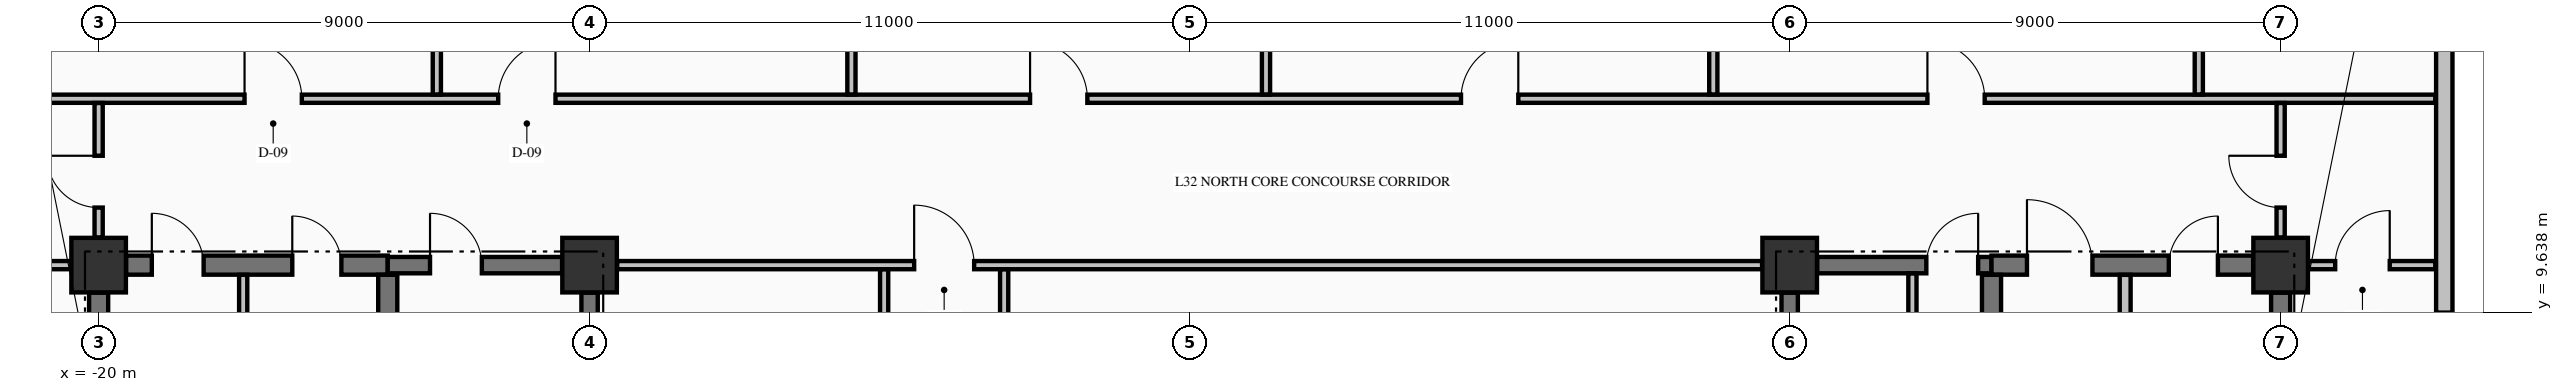
"""IFC4 building model, lengths in metres.
Left out: names, types, materials, properties, quantities, classifications, styles, units other than length and angle.
Written with IfcOpenShell. Run it as: python <this file> out.ifc"""

import sys

from ifc_helpers import new_model, si_unit, direction, frame, frame_2d, origin, origin_2d, place, context, subcontext, project, spatial, rectangle, extrude, element, fill, save


model = new_model("IFC4")
c1 = context("Model", 3, precision=1e-05, world=origin(), true_north=direction((0.0, 1.0)))
c2 = subcontext(c1, "Body", "Model", "MODEL_VIEW")
j1 = project(units=[si_unit("LENGTHUNIT", "METRE"), si_unit("PLANEANGLEUNIT", "RADIAN")], contexts=[c1])
p1 = place(None, origin())
s1 = spatial("IfcSite", under=j1, at=p1, CompositionType="ELEMENT")
p2 = place(p1, origin())
s2 = spatial("IfcBuilding", under=s1, at=p2, CompositionType="ELEMENT")
p3 = place(p2, frame((0.0, 0.0, 128.49)))
s3 = spatial("IfcBuildingStorey", under=s2, at=p3, CompositionType="ELEMENT", Elevation=128.49)
for number, where, z_axis, x_axis in (
    (1, (-20.0, 10.5, -0.25), (0.0, 0.0, 1.0), (1.0, 0.0, 0.0)),
    (2, (-11.0, 10.5, -0.25), (0.0, 0.0, 1.0), (1.0, 0.0, 0.0)),
    (3, (11.0, 10.5, -0.25), (0.0, 0.0, 1.0), (1.0, 0.0, 0.0)),
    (4, (20.0, 10.5, -0.25), (0.0, 0.0, 1.0), (1.0, 0.0, 0.0)),
):
    element("IfcColumn", number, at=place(p3, frame(where, z_axis=z_axis, x_axis=x_axis)), inside=s3, PredefinedType="COLUMN", context=c2, shape_type="SweptSolid", body=[
        extrude(rectangle(XDim=1.0, YDim=1.0, at=origin_2d()), origin(), (0.0, 0.0, 1.0), 3.57),
    ])
p4 = place(p3, frame((23.0, 9.63, 0.0), z_axis=(0.0, 0.0, 1.0), x_axis=(0.0, 1.0, 0.0)))
e5 = element("IfcWall", 5, at=p4, inside=s3, PredefinedType="STANDARD", context=c2, shape_type="SweptSolid", body=[
    extrude(rectangle(XDim=10.74, YDim=0.3, at=frame_2d((5.37, 0.0))), origin(), (0.0, 0.0, 1.0), 2.712),
])
p5 = place(p3, frame((-19.496, 10.5, 0.0), z_axis=(0.0, 0.0, 1.0), x_axis=(1.0, 0.0, 0.0)))
e6 = element("IfcWall", 6, at=p5, inside=s3, PredefinedType="SHEAR", context=c2, shape_type="SweptSolid", body=[
    extrude(rectangle(XDim=4.796, YDim=0.35, at=frame_2d((2.398, 0.0))), origin(), (0.0, 0.0, 1.0), 3.32),
])
p6 = place(p5, frame((0.471, 0.0, 0.0)))
e7 = element("IfcOpeningElement", 7, at=p6, cuts=e6, PredefinedType="OPENING", context=c2, shape_type="SweptSolid", body=[
    extrude(rectangle(XDim=0.95, YDim=2.15, at=frame_2d((0.475, 1.075))), frame((0.0, 0.185, 0.0), z_axis=(0.0, -1.0, 0.0), x_axis=(1.0, 0.0, 0.0)), (0.0, 0.0, 1.0), 0.37),
])
p7 = place(p5, frame((3.046, 0.0, 0.0)))
e8 = element("IfcOpeningElement", 8, at=p7, cuts=e6, PredefinedType="OPENING", context=c2, shape_type="SweptSolid", body=[
    extrude(rectangle(XDim=0.9, YDim=2.15, at=frame_2d((0.45, 1.075))), frame((0.0, 0.185, 0.0), z_axis=(0.0, -1.0, 0.0), x_axis=(1.0, 0.0, 0.0)), (0.0, 0.0, 1.0), 0.37),
])
p8 = place(p3, frame((-14.7, 10.5, 0.0), z_axis=(0.0, 0.0, 1.0), x_axis=(1.0, 0.0, 0.0)))
e9 = element("IfcWall", 9, at=p8, inside=s3, PredefinedType="SHEAR", context=c2, shape_type="SweptSolid", body=[
    extrude(rectangle(XDim=3.196, YDim=0.3, at=frame_2d((1.598, 0.0))), origin(), (0.0, 0.0, 1.0), 3.32),
])
p9 = place(p8, frame((0.775, 0.0, 0.0)))
e10 = element("IfcOpeningElement", 10, at=p9, cuts=e9, PredefinedType="OPENING", context=c2, shape_type="SweptSolid", body=[
    extrude(rectangle(XDim=0.95, YDim=2.15, at=frame_2d((0.475, 1.075))), frame((0.0, 0.16, 0.0), z_axis=(0.0, -1.0, 0.0), x_axis=(1.0, 0.0, 0.0)), (0.0, 0.0, 1.0), 0.32),
])
p10 = place(p3, frame((11.504, 10.5, 0.0), z_axis=(0.0, 0.0, 1.0), x_axis=(1.0, 0.0, 0.0)))
e11 = element("IfcWall", 11, at=p10, inside=s3, PredefinedType="SHEAR", context=c2, shape_type="SweptSolid", body=[
    extrude(rectangle(XDim=3.196, YDim=0.3, at=frame_2d((1.598, 0.0))), origin(), (0.0, 0.0, 1.0), 3.32),
])
p11 = place(p10, frame((2.001, 0.0, 0.0)))
e12 = element("IfcOpeningElement", 12, at=p11, cuts=e11, PredefinedType="OPENING", context=c2, shape_type="SweptSolid", body=[
    extrude(rectangle(XDim=0.95, YDim=2.15, at=frame_2d((0.475, 1.075))), frame((0.0, 0.16, 0.0), z_axis=(0.0, -1.0, 0.0), x_axis=(1.0, 0.0, 0.0)), (0.0, 0.0, 1.0), 0.32),
])
p12 = place(p3, frame((14.7, 10.5, 0.0), z_axis=(0.0, 0.0, 1.0), x_axis=(1.0, 0.0, 0.0)))
e13 = element("IfcWall", 13, at=p12, inside=s3, PredefinedType="SHEAR", context=c2, shape_type="SweptSolid", body=[
    extrude(rectangle(XDim=4.796, YDim=0.35, at=frame_2d((2.398, 0.0))), origin(), (0.0, 0.0, 1.0), 3.32),
])
p13 = place(p12, frame((0.65, 0.0, 0.0)))
e14 = element("IfcOpeningElement", 14, at=p13, cuts=e13, PredefinedType="OPENING", context=c2, shape_type="SweptSolid", body=[
    extrude(rectangle(XDim=1.2, YDim=2.15, at=frame_2d((0.6, 1.075))), frame((0.0, 0.185, 0.0), z_axis=(0.0, -1.0, 0.0), x_axis=(1.0, 0.0, 0.0)), (0.0, 0.0, 1.0), 0.37),
])
p14 = place(p12, frame((3.25, 0.0, 0.0)))
e15 = element("IfcOpeningElement", 15, at=p14, cuts=e13, PredefinedType="OPENING", context=c2, shape_type="SweptSolid", body=[
    extrude(rectangle(XDim=0.9, YDim=2.15, at=frame_2d((0.45, 1.075))), frame((0.0, 0.185, 0.0), z_axis=(0.0, -1.0, 0.0), x_axis=(1.0, 0.0, 0.0)), (0.0, 0.0, 1.0), 0.37),
])
p15 = place(p3, frame((-27.835, 10.5, 0.0), z_axis=(0.0, 0.0, 1.0), x_axis=(1.0, 0.0, 0.0)))
e16 = element("IfcWall", 16, at=p15, inside=s3, PredefinedType="PARTITIONING", context=c2, shape_type="SweptSolid", body=[
    extrude(rectangle(XDim=7.329, YDim=0.15, at=frame_2d((3.665, 0.0))), origin(), (0.0, 0.0, 1.0), 3.32),
])
p16 = place(p15, frame((3.36, 0.0, 0.0)))
e17 = element("IfcOpeningElement", 17, at=p16, cuts=e16, PredefinedType="OPENING", context=c2, shape_type="SweptSolid", body=[
    extrude(rectangle(XDim=0.95, YDim=2.15, at=frame_2d((0.475, 1.075))), frame((0.0, 0.085, 0.0), z_axis=(0.0, -1.0, 0.0), x_axis=(1.0, 0.0, 0.0)), (0.0, 0.0, 1.0), 0.17),
])
p17 = place(p3, frame((-10.494, 10.5, 0.0), z_axis=(0.0, 0.0, 1.0), x_axis=(1.0, 0.0, 0.0)))
e18 = element("IfcWall", 18, at=p17, inside=s3, PredefinedType="PARTITIONING", context=c2, shape_type="SweptSolid", body=[
    extrude(rectangle(XDim=20.988, YDim=0.15, at=frame_2d((10.494, 0.0))), origin(), (0.0, 0.0, 1.0), 3.32),
])
p18 = place(p17, frame((5.444, 0.0, 0.0)))
e19 = element("IfcOpeningElement", 19, at=p18, cuts=e18, PredefinedType="OPENING", context=c2, shape_type="SweptSolid", body=[
    extrude(rectangle(XDim=1.1, YDim=2.15, at=frame_2d((0.55, 1.075))), frame((0.0, 0.085, 0.0), z_axis=(0.0, -1.0, 0.0), x_axis=(1.0, 0.0, 0.0)), (0.0, 0.0, 1.0), 0.17),
])
p19 = place(p3, frame((20.506, 10.5, 0.0), z_axis=(0.0, 0.0, 1.0), x_axis=(1.0, 0.0, 0.0)))
e20 = element("IfcWall", 20, at=p19, inside=s3, PredefinedType="PARTITIONING", context=c2, shape_type="SweptSolid", body=[
    extrude(rectangle(XDim=2.329, YDim=0.15, at=frame_2d((1.165, 0.0))), origin(), (0.0, 0.0, 1.0), 3.32),
])
p20 = place(p19, frame((0.494, 0.0, 0.0)))
e21 = element("IfcOpeningElement", 21, at=p20, cuts=e20, PredefinedType="OPENING", context=c2, shape_type="SweptSolid", body=[
    extrude(rectangle(XDim=1.0, YDim=2.15, at=frame_2d((0.5, 1.075))), frame((0.0, 0.085, 0.0), z_axis=(0.0, -1.0, 0.0), x_axis=(1.0, 0.0, 0.0)), (0.0, 0.0, 1.0), 0.17),
])
p21 = place(p3, frame((-27.835, 13.55, 0.0), z_axis=(0.0, 0.0, 1.0), x_axis=(1.0, 0.0, 0.0)))
e22 = element("IfcWall", 22, at=p21, inside=s3, PredefinedType="PARTITIONING", context=c2, shape_type="SweptSolid", body=[
    extrude(rectangle(XDim=50.67, YDim=0.15, at=frame_2d((25.335, 0.0))), origin(), (0.0, 0.0, 1.0), 3.32),
])
p22 = place(p21, frame((10.51, 0.0, 0.0)))
e23 = element("IfcOpeningElement", 23, at=p22, cuts=e22, PredefinedType="OPENING", context=c2, shape_type="SweptSolid", body=[
    extrude(rectangle(XDim=1.05, YDim=2.15, at=frame_2d((0.525, 1.075))), frame((0.0, 0.085, 0.0), z_axis=(0.0, -1.0, 0.0), x_axis=(1.0, 0.0, 0.0)), (0.0, 0.0, 1.0), 0.17),
])
p23 = place(p21, frame((15.16, 0.0, 0.0)))
e24 = element("IfcOpeningElement", 24, at=p23, cuts=e22, PredefinedType="OPENING", context=c2, shape_type="SweptSolid", body=[
    extrude(rectangle(XDim=1.05, YDim=2.15, at=frame_2d((0.525, 1.075))), frame((0.0, 0.085, 0.0), z_axis=(0.0, -1.0, 0.0), x_axis=(1.0, 0.0, 0.0)), (0.0, 0.0, 1.0), 0.17),
])
p24 = place(p21, frame((24.91, 0.0, 0.0)))
e25 = element("IfcOpeningElement", 25, at=p24, cuts=e22, PredefinedType="OPENING", context=c2, shape_type="SweptSolid", body=[
    extrude(rectangle(XDim=1.05, YDim=2.15, at=frame_2d((0.525, 1.075))), frame((0.0, 0.085, 0.0), z_axis=(0.0, -1.0, 0.0), x_axis=(1.0, 0.0, 0.0)), (0.0, 0.0, 1.0), 0.17),
])
p25 = place(p21, frame((32.81, 0.0, 0.0)))
e26 = element("IfcOpeningElement", 26, at=p25, cuts=e22, PredefinedType="OPENING", context=c2, shape_type="SweptSolid", body=[
    extrude(rectangle(XDim=1.05, YDim=2.15, at=frame_2d((0.525, 1.075))), frame((0.0, 0.085, 0.0), z_axis=(0.0, -1.0, 0.0), x_axis=(1.0, 0.0, 0.0)), (0.0, 0.0, 1.0), 0.17),
])
p26 = place(p21, frame((41.36, 0.0, 0.0)))
e27 = element("IfcOpeningElement", 27, at=p26, cuts=e22, PredefinedType="OPENING", context=c2, shape_type="SweptSolid", body=[
    extrude(rectangle(XDim=1.05, YDim=2.15, at=frame_2d((0.525, 1.075))), frame((0.0, 0.085, 0.0), z_axis=(0.0, -1.0, 0.0), x_axis=(1.0, 0.0, 0.0)), (0.0, 0.0, 1.0), 0.17),
])
p27 = place(p3, frame((-20.0, 0.504, 0.0), z_axis=(0.0, 0.0, 1.0), x_axis=(0.0, 1.0, 0.0)))
e28 = element("IfcWall", 28, at=p27, inside=s3, PredefinedType="SHEAR", context=c2, shape_type="SweptSolid", body=[
    extrude(rectangle(XDim=9.492, YDim=0.35, at=frame_2d((4.746, 0.0))), origin(), (0.0, 0.0, 1.0), 3.32),
])
p28 = place(p3, frame((-14.7, 5.852, 0.0), z_axis=(0.0, 0.0, 1.0), x_axis=(0.0, 1.0, 0.0)))
e29 = element("IfcWall", 29, at=p28, inside=s3, PredefinedType="SHEAR", context=c2, shape_type="SweptSolid", body=[
    extrude(rectangle(XDim=4.471, YDim=0.35, at=frame_2d((2.235, 0.0))), origin(), (0.0, 0.0, 1.0), 3.32),
])
for number, where, z_axis, x_axis in (
    (30, (-11.0, 5.852, 0.0), (0.0, 0.0, 1.0), (0.0, 1.0, 0.0)),
    (31, (11.0, 5.852, 0.0), (0.0, 0.0, 1.0), (0.0, 1.0, 0.0)),
):
    element("IfcWall", number, at=place(p3, frame(where, z_axis=z_axis, x_axis=x_axis)), inside=s3, PredefinedType="SHEAR", context=c2, shape_type="SweptSolid", body=[
        extrude(rectangle(XDim=4.144, YDim=0.3, at=frame_2d((2.072, 0.0))), origin(), (0.0, 0.0, 1.0), 3.32),
    ])
p29 = place(p3, frame((14.7, 5.852, 0.0), z_axis=(0.0, 0.0, 1.0), x_axis=(0.0, 1.0, 0.0)))
e32 = element("IfcWall", 32, at=p29, inside=s3, PredefinedType="SHEAR", context=c2, shape_type="SweptSolid", body=[
    extrude(rectangle(XDim=4.471, YDim=0.35, at=frame_2d((2.235, 0.0))), origin(), (0.0, 0.0, 1.0), 3.32),
])
p30 = place(p3, frame((20.0, 5.377, 0.0), z_axis=(0.0, 0.0, 1.0), x_axis=(0.0, 1.0, 0.0)))
e33 = element("IfcWall", 33, at=p30, inside=s3, PredefinedType="SHEAR", context=c2, shape_type="SweptSolid", body=[
    extrude(rectangle(XDim=4.619, YDim=0.35, at=frame_2d((2.31, 0.0))), origin(), (0.0, 0.0, 1.0), 3.32),
])
p31 = place(p3, frame((-20.0, 11.006, 0.0), z_axis=(0.0, 0.0, 1.0), x_axis=(0.0, 1.0, 0.0)))
e34 = element("IfcWall", 34, at=p31, inside=s3, PredefinedType="PARTITIONING", context=c2, shape_type="SweptSolid", body=[
    extrude(rectangle(XDim=2.466, YDim=0.15, at=frame_2d((1.233, 0.0))), origin(), (0.0, 0.0, 1.0), 2.81),
])
p32 = place(p31, frame((0.549, 0.0, 0.0)))
e35 = element("IfcOpeningElement", 35, at=p32, cuts=e34, PredefinedType="OPENING", context=c2, shape_type="SweptSolid", body=[
    extrude(rectangle(XDim=0.95, YDim=2.15, at=frame_2d((0.475, 1.075))), frame((0.0, 0.085, 0.0), z_axis=(0.0, -1.0, 0.0), x_axis=(1.0, 0.0, 0.0)), (0.0, 0.0, 1.0), 0.17),
])
p33 = place(p3, frame((-17.35, 5.178, 0.0), z_axis=(0.0, 0.0, 1.0), x_axis=(0.0, 1.0, 0.0)))
e36 = element("IfcWall", 36, at=p33, inside=s3, PredefinedType="PARTITIONING", context=c2, shape_type="SweptSolid", body=[
    extrude(rectangle(XDim=5.144, YDim=0.15, at=frame_2d((2.572, 0.0))), origin(), (0.0, 0.0, 1.0), 3.32),
])
for number, where, z_axis, x_axis in (
    (37, (-13.8, 13.628, 0.0), (0.0, 0.0, 1.0), (0.0, 1.0, 0.0)),
    (38, (-6.2, 13.628, 0.0), (0.0, 0.0, 1.0), (0.0, 1.0, 0.0)),
):
    element("IfcWall", number, at=place(p3, frame(where, z_axis=z_axis, x_axis=x_axis)), inside=s3, PredefinedType="PARTITIONING", context=c2, shape_type="SweptSolid", body=[
        extrude(rectangle(XDim=11.707, YDim=0.15, at=frame_2d((5.854, 0.0))), origin(), (0.0, 0.0, 1.0), 3.32),
    ])
for number, where, z_axis, x_axis in (
    (39, (-5.6, 2.978, 0.0), (0.0, 0.0, 1.0), (0.0, 1.0, 0.0)),
    (40, (-3.4, 2.978, 0.0), (0.0, 0.0, 1.0), (0.0, 1.0, 0.0)),
):
    element("IfcWall", number, at=place(p3, frame(where, z_axis=z_axis, x_axis=x_axis)), inside=s3, PredefinedType="PARTITIONING", context=c2, shape_type="SweptSolid", body=[
        extrude(rectangle(XDim=7.444, YDim=0.15, at=frame_2d((3.722, 0.0))), origin(), (0.0, 0.0, 1.0), 3.32),
    ])
for number, where, z_axis, x_axis in (
    (41, (1.4, 13.628, 0.0), (0.0, 0.0, 1.0), (0.0, 1.0, 0.0)),
    (42, (9.6, 13.628, 0.0), (0.0, 0.0, 1.0), (0.0, 1.0, 0.0)),
):
    element("IfcWall", number, at=place(p3, frame(where, z_axis=z_axis, x_axis=x_axis)), inside=s3, PredefinedType="PARTITIONING", context=c2, shape_type="SweptSolid", body=[
        extrude(rectangle(XDim=11.707, YDim=0.15, at=frame_2d((5.854, 0.0))), origin(), (0.0, 0.0, 1.0), 3.32),
    ])
p34 = place(p3, frame((13.25, 5.853, 0.0), z_axis=(0.0, 0.0, 1.0), x_axis=(0.0, 1.0, 0.0)))
e43 = element("IfcWall", 43, at=p34, inside=s3, PredefinedType="PARTITIONING", context=c2, shape_type="SweptSolid", body=[
    extrude(rectangle(XDim=4.494, YDim=0.15, at=frame_2d((2.247, 0.0))), origin(), (0.0, 0.0, 1.0), 3.32),
])
p35 = place(p34, frame((1.472, 0.0, 0.0)))
e44 = element("IfcOpeningElement", 44, at=p35, cuts=e43, PredefinedType="OPENING", context=c2, shape_type="SweptSolid", body=[
    extrude(rectangle(XDim=0.95, YDim=2.15, at=frame_2d((0.475, 1.075))), frame((0.0, 0.085, 0.0), z_axis=(0.0, -1.0, 0.0), x_axis=(1.0, 0.0, 0.0)), (0.0, 0.0, 1.0), 0.17),
])
p36 = place(p3, frame((17.15, 5.378, 0.0), z_axis=(0.0, 0.0, 1.0), x_axis=(0.0, 1.0, 0.0)))
e45 = element("IfcWall", 45, at=p36, inside=s3, PredefinedType="PARTITIONING", context=c2, shape_type="SweptSolid", body=[
    extrude(rectangle(XDim=4.944, YDim=0.2, at=frame_2d((2.472, 0.0))), origin(), (0.0, 0.0, 1.0), 3.32),
])
p37 = place(p3, frame((18.5, 13.628, 0.0), z_axis=(0.0, 0.0, 1.0), x_axis=(0.0, 1.0, 0.0)))
e46 = element("IfcWall", 46, at=p37, inside=s3, PredefinedType="PARTITIONING", context=c2, shape_type="SweptSolid", body=[
    extrude(rectangle(XDim=6.766, YDim=0.15, at=frame_2d((3.383, 0.0))), origin(), (0.0, 0.0, 1.0), 3.32),
])
p38 = place(p3, frame((20.0, 11.006, 0.0), z_axis=(0.0, 0.0, 1.0), x_axis=(0.0, 1.0, 0.0)))
e47 = element("IfcWall", 47, at=p38, inside=s3, PredefinedType="PARTITIONING", context=c2, shape_type="SweptSolid", body=[
    extrude(rectangle(XDim=2.466, YDim=0.15, at=frame_2d((1.233, 0.0))), origin(), (0.0, 0.0, 1.0), 2.81),
])
p39 = place(p38, frame((0.549, 0.0, 0.0)))
e48 = element("IfcOpeningElement", 48, at=p39, cuts=e47, PredefinedType="OPENING", context=c2, shape_type="SweptSolid", body=[
    extrude(rectangle(XDim=0.95, YDim=2.15, at=frame_2d((0.475, 1.075))), frame((0.0, 0.085, 0.0), z_axis=(0.0, -1.0, 0.0), x_axis=(1.0, 0.0, 0.0)), (0.0, 0.0, 1.0), 0.17),
])
p40 = place(p9, origin())
e49 = element("IfcDoor", 49, at=p40, inside=s3, OperationType="SINGLE_SWING_LEFT", PredefinedType="DOOR", context=c2, shape_type="SweptSolid", body=[
    extrude(rectangle(XDim=0.95, YDim=2.15, at=frame_2d((0.475, 1.075))), frame((0.0, 0.025, 0.0), z_axis=(0.0, -1.0, 0.0), x_axis=(1.0, 0.0, 0.0)), (0.0, 0.0, 1.0), 0.05),
])
fill(e10, e49)
p41 = place(p11, origin())
e50 = element("IfcDoor", 50, at=p41, inside=s3, OperationType="SINGLE_SWING_RIGHT", PredefinedType="DOOR", context=c2, shape_type="SweptSolid", body=[
    extrude(rectangle(XDim=0.95, YDim=2.15, at=frame_2d((0.475, 1.075))), frame((0.0, 0.025, 0.0), z_axis=(0.0, -1.0, 0.0), x_axis=(1.0, 0.0, 0.0)), (0.0, 0.0, 1.0), 0.05),
])
fill(e12, e50)
p42 = place(p6, origin())
e51 = element("IfcDoor", 51, at=p42, inside=s3, OperationType="SINGLE_SWING_LEFT", PredefinedType="DOOR", context=c2, shape_type="SweptSolid", body=[
    extrude(rectangle(XDim=0.95, YDim=2.15, at=frame_2d((0.475, 1.075))), frame((0.0, 0.025, 0.0), z_axis=(0.0, -1.0, 0.0), x_axis=(1.0, 0.0, 0.0)), (0.0, 0.0, 1.0), 0.05),
])
fill(e7, e51)
p43 = place(p7, origin())
e52 = element("IfcDoor", 52, at=p43, inside=s3, OperationType="SINGLE_SWING_LEFT", PredefinedType="DOOR", context=c2, shape_type="SweptSolid", body=[
    extrude(rectangle(XDim=0.9, YDim=2.15, at=frame_2d((0.45, 1.075))), frame((0.0, 0.025, 0.0), z_axis=(0.0, -1.0, 0.0), x_axis=(1.0, 0.0, 0.0)), (0.0, 0.0, 1.0), 0.05),
])
fill(e8, e52)
p44 = place(p13, origin())
e53 = element("IfcDoor", 53, at=p44, inside=s3, OperationType="SINGLE_SWING_LEFT", PredefinedType="DOOR", context=c2, shape_type="SweptSolid", body=[
    extrude(rectangle(XDim=1.2, YDim=2.15, at=frame_2d((0.6, 1.075))), frame((0.0, 0.025, 0.0), z_axis=(0.0, -1.0, 0.0), x_axis=(1.0, 0.0, 0.0)), (0.0, 0.0, 1.0), 0.05),
])
fill(e14, e53)
p45 = place(p14, origin())
e54 = element("IfcDoor", 54, at=p45, inside=s3, OperationType="SINGLE_SWING_RIGHT", PredefinedType="DOOR", context=c2, shape_type="SweptSolid", body=[
    extrude(rectangle(XDim=0.9, YDim=2.15, at=frame_2d((0.45, 1.075))), frame((0.0, 0.025, 0.0), z_axis=(0.0, -1.0, 0.0), x_axis=(1.0, 0.0, 0.0)), (0.0, 0.0, 1.0), 0.05),
])
fill(e15, e54)
p46 = place(p18, origin())
e55 = element("IfcDoor", 55, at=p46, inside=s3, OperationType="SINGLE_SWING_LEFT", PredefinedType="DOOR", context=c2, shape_type="SweptSolid", body=[
    extrude(rectangle(XDim=1.1, YDim=2.15, at=frame_2d((0.55, 1.075))), frame((0.0, 0.025, 0.0), z_axis=(0.0, -1.0, 0.0), x_axis=(1.0, 0.0, 0.0)), (0.0, 0.0, 1.0), 0.05),
])
fill(e19, e55)
p47 = place(p22, origin())
e56 = element("IfcDoor", 56, at=p47, inside=s3, OperationType="SINGLE_SWING_LEFT", PredefinedType="DOOR", context=c2, shape_type="SweptSolid", body=[
    extrude(rectangle(XDim=1.05, YDim=2.15, at=frame_2d((0.525, 1.075))), frame((0.0, 0.025, 0.0), z_axis=(0.0, -1.0, 0.0), x_axis=(1.0, 0.0, 0.0)), (0.0, 0.0, 1.0), 0.05),
])
fill(e23, e56)
p48 = place(p23, origin())
e57 = element("IfcDoor", 57, at=p48, inside=s3, OperationType="SINGLE_SWING_RIGHT", PredefinedType="DOOR", context=c2, shape_type="SweptSolid", body=[
    extrude(rectangle(XDim=1.05, YDim=2.15, at=frame_2d((0.525, 1.075))), frame((0.0, 0.025, 0.0), z_axis=(0.0, -1.0, 0.0), x_axis=(1.0, 0.0, 0.0)), (0.0, 0.0, 1.0), 0.05),
])
fill(e24, e57)
p49 = place(p24, origin())
e58 = element("IfcDoor", 58, at=p49, inside=s3, OperationType="SINGLE_SWING_LEFT", PredefinedType="DOOR", context=c2, shape_type="SweptSolid", body=[
    extrude(rectangle(XDim=1.05, YDim=2.15, at=frame_2d((0.525, 1.075))), frame((0.0, 0.025, 0.0), z_axis=(0.0, -1.0, 0.0), x_axis=(1.0, 0.0, 0.0)), (0.0, 0.0, 1.0), 0.05),
])
fill(e25, e58)
p50 = place(p25, origin())
e59 = element("IfcDoor", 59, at=p50, inside=s3, OperationType="SINGLE_SWING_RIGHT", PredefinedType="DOOR", context=c2, shape_type="SweptSolid", body=[
    extrude(rectangle(XDim=1.05, YDim=2.15, at=frame_2d((0.525, 1.075))), frame((0.0, 0.025, 0.0), z_axis=(0.0, -1.0, 0.0), x_axis=(1.0, 0.0, 0.0)), (0.0, 0.0, 1.0), 0.05),
])
fill(e26, e59)
p51 = place(p26, origin())
e60 = element("IfcDoor", 60, at=p51, inside=s3, OperationType="SINGLE_SWING_LEFT", PredefinedType="DOOR", context=c2, shape_type="SweptSolid", body=[
    extrude(rectangle(XDim=1.05, YDim=2.15, at=frame_2d((0.525, 1.075))), frame((0.0, 0.025, 0.0), z_axis=(0.0, -1.0, 0.0), x_axis=(1.0, 0.0, 0.0)), (0.0, 0.0, 1.0), 0.05),
])
fill(e27, e60)
p52 = place(p32, origin())
e61 = element("IfcDoor", 61, at=p52, inside=s3, OperationType="SINGLE_SWING_RIGHT", PredefinedType="DOOR", context=c2, shape_type="SweptSolid", body=[
    extrude(rectangle(XDim=0.95, YDim=2.15, at=frame_2d((0.475, 1.075))), frame((0.0, 0.025, 0.0), z_axis=(0.0, -1.0, 0.0), x_axis=(1.0, 0.0, 0.0)), (0.0, 0.0, 1.0), 0.05),
])
fill(e35, e61)
p53 = place(p39, origin())
e62 = element("IfcDoor", 62, at=p53, inside=s3, OperationType="SINGLE_SWING_RIGHT", PredefinedType="DOOR", context=c2, shape_type="SweptSolid", body=[
    extrude(rectangle(XDim=0.95, YDim=2.15, at=frame_2d((0.475, 1.075))), frame((0.0, 0.025, 0.0), z_axis=(0.0, -1.0, 0.0), x_axis=(1.0, 0.0, 0.0)), (0.0, 0.0, 1.0), 0.05),
])
fill(e48, e62)
p54 = place(p20, origin())
e63 = element("IfcDoor", 63, at=p54, inside=s3, OperationType="SINGLE_SWING_RIGHT", PredefinedType="DOOR", context=c2, shape_type="SweptSolid", body=[
    extrude(rectangle(XDim=1.0, YDim=2.15, at=frame_2d((0.5, 1.075))), frame((0.0, 0.025, 0.0), z_axis=(0.0, -1.0, 0.0), x_axis=(1.0, 0.0, 0.0)), (0.0, 0.0, 1.0), 0.05),
])
fill(e21, e63)
save(model, sys.argv[1])
